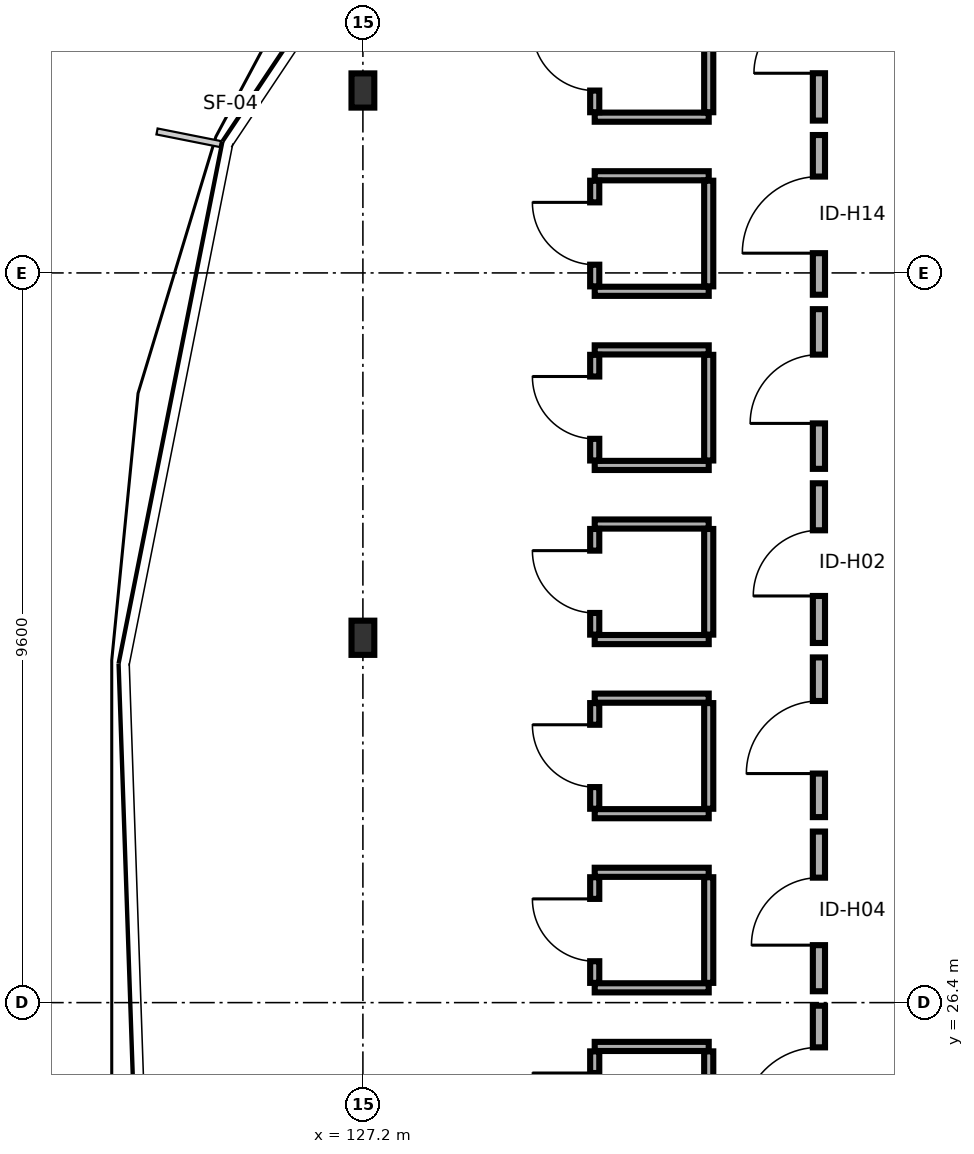
"""IFC4 building model, lengths in metres.
Left out: names, types, materials, properties, quantities, classifications, styles, units other than length and angle.
Written with IfcOpenShell. Run it as: python <this file> out.ifc"""

import sys

from ifc_helpers import new_model, si_unit, direction, frame, frame_2d, origin, origin_2d, place, context, subcontext, project, spatial, rectangle, i_section, extrude, element, fill, save


model = new_model("IFC4")
c1 = context("Model", 3, precision=1e-05, world=origin(), true_north=direction((0.0, 1.0)))
c2 = subcontext(c1, "Body", "Model", "MODEL_VIEW")
j1 = project(units=[si_unit("LENGTHUNIT", "METRE"), si_unit("PLANEANGLEUNIT", "RADIAN")], contexts=[c1])
p1 = place(None, origin())
s1 = spatial("IfcSite", under=j1, at=p1, CompositionType="ELEMENT")
p2 = place(p1, origin())
s2 = spatial("IfcBuilding", under=s1, at=p2, CompositionType="ELEMENT")
p3 = place(p2, frame((0.0, 0.0, 28.3)))
s3 = spatial("IfcBuildingStorey", under=s2, at=p3, CompositionType="ELEMENT", Elevation=28.3)
for number, where, z_axis, x_axis in (
    (1, (127.2, 38.4, 0.0), (0.0, 0.0, 1.0), (1.0, 0.0, 0.0)),
    (2, (127.2, 31.2, 0.0), (0.0, 0.0, 1.0), (1.0, 0.0, 0.0)),
):
    element("IfcColumn", number, at=place(p3, frame(where, z_axis=z_axis, x_axis=x_axis)), inside=s3, PredefinedType="COLUMN", context=c2, shape_type="SweptSolid", body=[
        extrude(i_section(OverallWidth=0.3, OverallDepth=0.45, WebThickness=0.014, FlangeThickness=0.026, FilletRadius=0.027, at=origin_2d()), origin(), (0.0, 0.0, 1.0), 3.4),
    ])
p4 = place(p3, frame((133.2, 38.004, 0.0), z_axis=(0.0, 0.0, 1.0), x_axis=(0.0, 1.0, 0.0)))
e3 = element("IfcWall", 3, at=p4, inside=s3, PredefinedType="PARTITIONING", context=c2, shape_type="SweptSolid", body=[
    extrude(rectangle(XDim=2.101, YDim=0.16, at=frame_2d((1.05, 0.0))), origin(), (0.0, 0.0, 1.0), 2.71),
])
p5 = place(p4, frame((0.623, 0.0, 0.0)))
e4 = element("IfcOpeningElement", 4, at=p5, cuts=e3, PredefinedType="OPENING", context=c2, shape_type="SweptSolid", body=[
    extrude(rectangle(XDim=0.855, YDim=2.05, at=frame_2d((0.427, 1.025))), frame((0.0, 0.09, 0.0), z_axis=(0.0, -1.0, 0.0), x_axis=(1.0, 0.0, 0.0)), (0.0, 0.0, 1.0), 0.18),
])
p6 = place(p3, frame((130.25, 38.049, 0.0), z_axis=(0.0, 0.0, 1.0), x_axis=(1.0, 0.0, 0.0)))
e5 = element("IfcWall", 5, at=p6, inside=s3, PredefinedType="PARTITIONING", context=c2, shape_type="SweptSolid", body=[
    extrude(rectangle(XDim=1.5, YDim=0.12, at=frame_2d((0.75, 0.0))), origin(), (0.0, 0.0, 1.0), 3.175),
])
p7 = place(p3, frame((130.25, 38.114, 0.0), z_axis=(0.0, 0.0, 1.0), x_axis=(0.0, 1.0, 0.0)))
e6 = element("IfcWall", 6, at=p7, inside=s3, PredefinedType="PARTITIONING", context=c2, shape_type="SweptSolid", body=[
    extrude(rectangle(XDim=1.39, YDim=0.12, at=frame_2d((0.695, 0.0))), origin(), (0.0, 0.0, 1.0), 2.71),
])
p8 = place(p7, frame((0.285, 0.0, 0.0)))
e7 = element("IfcOpeningElement", 7, at=p8, cuts=e6, PredefinedType="OPENING", context=c2, shape_type="SweptSolid", body=[
    extrude(rectangle(XDim=0.82, YDim=2.08, at=frame_2d((0.41, 1.04))), frame((0.0, 0.07, 0.0), z_axis=(0.0, -1.0, 0.0), x_axis=(1.0, 0.0, 0.0)), (0.0, 0.0, 1.0), 0.14),
])
p9 = place(p3, frame((131.75, 38.114, 0.0), z_axis=(0.0, 0.0, 1.0), x_axis=(0.0, 1.0, 0.0)))
e8 = element("IfcWall", 8, at=p9, inside=s3, PredefinedType="PARTITIONING", context=c2, shape_type="SweptSolid", body=[
    extrude(rectangle(XDim=1.39, YDim=0.12, at=frame_2d((0.695, 0.0))), origin(), (0.0, 0.0, 1.0), 2.71),
])
p10 = place(p3, frame((133.2, 35.713, 0.0), z_axis=(0.0, 0.0, 1.0), x_axis=(0.0, 1.0, 0.0)))
e9 = element("IfcWall", 9, at=p10, inside=s3, PredefinedType="PARTITIONING", context=c2, shape_type="SweptSolid", body=[
    extrude(rectangle(XDim=2.101, YDim=0.16, at=frame_2d((1.051, 0.0))), origin(), (0.0, 0.0, 1.0), 3.175),
])
p11 = place(p10, frame((0.546, 0.0, 0.0)))
e10 = element("IfcOpeningElement", 10, at=p11, cuts=e9, PredefinedType="OPENING", context=c2, shape_type="SweptSolid", body=[
    extrude(rectangle(XDim=1.008, YDim=2.13, at=frame_2d((0.504, 1.065))), frame((0.0, 0.09, 0.0), z_axis=(0.0, -1.0, 0.0), x_axis=(1.0, 0.0, 0.0)), (0.0, 0.0, 1.0), 0.18),
])
for number, where, z_axis, x_axis in (
    (11, (130.25, 35.758, 0.0), (0.0, 0.0, 1.0), (1.0, 0.0, 0.0)),
    (12, (130.25, 37.278, 0.0), (0.0, 0.0, 1.0), (1.0, 0.0, 0.0)),
):
    element("IfcWall", number, at=place(p3, frame(where, z_axis=z_axis, x_axis=x_axis)), inside=s3, PredefinedType="PARTITIONING", context=c2, shape_type="SweptSolid", body=[
        extrude(rectangle(XDim=1.5, YDim=0.12, at=frame_2d((0.75, 0.0))), origin(), (0.0, 0.0, 1.0), 3.175),
    ])
p12 = place(p3, frame((130.25, 35.823, 0.0), z_axis=(0.0, 0.0, 1.0), x_axis=(0.0, 1.0, 0.0)))
e13 = element("IfcWall", 13, at=p12, inside=s3, PredefinedType="PARTITIONING", context=c2, shape_type="SweptSolid", body=[
    extrude(rectangle(XDim=1.39, YDim=0.12, at=frame_2d((0.695, 0.0))), origin(), (0.0, 0.0, 1.0), 3.175),
])
p13 = place(p12, frame((0.285, 0.0, 0.0)))
e14 = element("IfcOpeningElement", 14, at=p13, cuts=e13, PredefinedType="OPENING", context=c2, shape_type="SweptSolid", body=[
    extrude(rectangle(XDim=0.82, YDim=2.08, at=frame_2d((0.41, 1.04))), frame((0.0, 0.07, 0.0), z_axis=(0.0, -1.0, 0.0), x_axis=(1.0, 0.0, 0.0)), (0.0, 0.0, 1.0), 0.14),
])
p14 = place(p3, frame((131.75, 35.823, 0.0), z_axis=(0.0, 0.0, 1.0), x_axis=(0.0, 1.0, 0.0)))
e15 = element("IfcWall", 15, at=p14, inside=s3, PredefinedType="PARTITIONING", context=c2, shape_type="SweptSolid", body=[
    extrude(rectangle(XDim=1.39, YDim=0.12, at=frame_2d((0.695, 0.0))), origin(), (0.0, 0.0, 1.0), 3.175),
])
p15 = place(p3, frame((133.2, 33.422, 0.0), z_axis=(0.0, 0.0, 1.0), x_axis=(0.0, 1.0, 0.0)))
e16 = element("IfcWall", 16, at=p15, inside=s3, PredefinedType="PARTITIONING", context=c2, shape_type="SweptSolid", body=[
    extrude(rectangle(XDim=2.101, YDim=0.16, at=frame_2d((1.05, 0.0))), origin(), (0.0, 0.0, 1.0), 3.175),
])
p16 = place(p15, frame((0.598, 0.0, 0.0)))
e17 = element("IfcOpeningElement", 17, at=p16, cuts=e16, PredefinedType="OPENING", context=c2, shape_type="SweptSolid", body=[
    extrude(rectangle(XDim=0.905, YDim=2.05, at=frame_2d((0.453, 1.025))), frame((0.0, 0.09, 0.0), z_axis=(0.0, -1.0, 0.0), x_axis=(1.0, 0.0, 0.0)), (0.0, 0.0, 1.0), 0.18),
])
for number, where, z_axis, x_axis in (
    (18, (130.25, 33.467, 0.0), (0.0, 0.0, 1.0), (1.0, 0.0, 0.0)),
    (19, (130.25, 34.987, 0.0), (0.0, 0.0, 1.0), (1.0, 0.0, 0.0)),
):
    element("IfcWall", number, at=place(p3, frame(where, z_axis=z_axis, x_axis=x_axis)), inside=s3, PredefinedType="PARTITIONING", context=c2, shape_type="SweptSolid", body=[
        extrude(rectangle(XDim=1.5, YDim=0.12, at=frame_2d((0.75, 0.0))), origin(), (0.0, 0.0, 1.0), 3.175),
    ])
p17 = place(p3, frame((130.25, 33.532, 0.0), z_axis=(0.0, 0.0, 1.0), x_axis=(0.0, 1.0, 0.0)))
e20 = element("IfcWall", 20, at=p17, inside=s3, PredefinedType="PARTITIONING", context=c2, shape_type="SweptSolid", body=[
    extrude(rectangle(XDim=1.39, YDim=0.12, at=frame_2d((0.695, 0.0))), origin(), (0.0, 0.0, 1.0), 3.175),
])
p18 = place(p17, frame((0.285, 0.0, 0.0)))
e21 = element("IfcOpeningElement", 21, at=p18, cuts=e20, PredefinedType="OPENING", context=c2, shape_type="SweptSolid", body=[
    extrude(rectangle(XDim=0.82, YDim=2.08, at=frame_2d((0.41, 1.04))), frame((0.0, 0.07, 0.0), z_axis=(0.0, -1.0, 0.0), x_axis=(1.0, 0.0, 0.0)), (0.0, 0.0, 1.0), 0.14),
])
p19 = place(p3, frame((131.75, 33.532, 0.0), z_axis=(0.0, 0.0, 1.0), x_axis=(0.0, 1.0, 0.0)))
e22 = element("IfcWall", 22, at=p19, inside=s3, PredefinedType="PARTITIONING", context=c2, shape_type="SweptSolid", body=[
    extrude(rectangle(XDim=1.39, YDim=0.12, at=frame_2d((0.695, 0.0))), origin(), (0.0, 0.0, 1.0), 3.175),
])
p20 = place(p3, frame((133.2, 31.131, 0.0), z_axis=(0.0, 0.0, 1.0), x_axis=(0.0, 1.0, 0.0)))
e23 = element("IfcWall", 23, at=p20, inside=s3, PredefinedType="PARTITIONING", context=c2, shape_type="SweptSolid", body=[
    extrude(rectangle(XDim=2.101, YDim=0.16, at=frame_2d((1.051, 0.0))), origin(), (0.0, 0.0, 1.0), 2.71),
])
p21 = place(p20, frame((0.618, 0.0, 0.0)))
e24 = element("IfcOpeningElement", 24, at=p21, cuts=e23, PredefinedType="OPENING", context=c2, shape_type="SweptSolid", body=[
    extrude(rectangle(XDim=0.864, YDim=2.13, at=frame_2d((0.432, 1.065))), frame((0.0, 0.09, 0.0), z_axis=(0.0, -1.0, 0.0), x_axis=(1.0, 0.0, 0.0)), (0.0, 0.0, 1.0), 0.18),
])
p22 = place(p3, frame((130.25, 31.177, 0.0), z_axis=(0.0, 0.0, 1.0), x_axis=(1.0, 0.0, 0.0)))
e25 = element("IfcWall", 25, at=p22, inside=s3, PredefinedType="PARTITIONING", context=c2, shape_type="SweptSolid", body=[
    extrude(rectangle(XDim=1.5, YDim=0.12, at=frame_2d((0.75, 0.0))), origin(), (0.0, 0.0, 1.0), 2.71),
])
p23 = place(p3, frame((130.25, 32.696, 0.0), z_axis=(0.0, 0.0, 1.0), x_axis=(1.0, 0.0, 0.0)))
e26 = element("IfcWall", 26, at=p23, inside=s3, PredefinedType="PARTITIONING", context=c2, shape_type="SweptSolid", body=[
    extrude(rectangle(XDim=1.5, YDim=0.12, at=frame_2d((0.75, 0.0))), origin(), (0.0, 0.0, 1.0), 3.175),
])
p24 = place(p3, frame((130.25, 31.241, 0.0), z_axis=(0.0, 0.0, 1.0), x_axis=(0.0, 1.0, 0.0)))
e27 = element("IfcWall", 27, at=p24, inside=s3, PredefinedType="PARTITIONING", context=c2, shape_type="SweptSolid", body=[
    extrude(rectangle(XDim=1.39, YDim=0.12, at=frame_2d((0.695, 0.0))), origin(), (0.0, 0.0, 1.0), 2.71),
])
p25 = place(p24, frame((0.285, 0.0, 0.0)))
e28 = element("IfcOpeningElement", 28, at=p25, cuts=e27, PredefinedType="OPENING", context=c2, shape_type="SweptSolid", body=[
    extrude(rectangle(XDim=0.82, YDim=2.08, at=frame_2d((0.41, 1.04))), frame((0.0, 0.07, 0.0), z_axis=(0.0, -1.0, 0.0), x_axis=(1.0, 0.0, 0.0)), (0.0, 0.0, 1.0), 0.14),
])
p26 = place(p3, frame((131.75, 31.241, 0.0), z_axis=(0.0, 0.0, 1.0), x_axis=(0.0, 1.0, 0.0)))
e29 = element("IfcWall", 29, at=p26, inside=s3, PredefinedType="PARTITIONING", context=c2, shape_type="SweptSolid", body=[
    extrude(rectangle(XDim=1.39, YDim=0.12, at=frame_2d((0.695, 0.0))), origin(), (0.0, 0.0, 1.0), 2.71),
])
p27 = place(p3, frame((133.2, 28.841, 0.0), z_axis=(0.0, 0.0, 1.0), x_axis=(0.0, 1.0, 0.0)))
e30 = element("IfcWall", 30, at=p27, inside=s3, PredefinedType="PARTITIONING", context=c2, shape_type="SweptSolid", body=[
    extrude(rectangle(XDim=2.101, YDim=0.16, at=frame_2d((1.05, 0.0))), origin(), (0.0, 0.0, 1.0), 3.175),
])
p28 = place(p27, frame((0.573, 0.0, 0.0)))
e31 = element("IfcOpeningElement", 31, at=p28, cuts=e30, PredefinedType="OPENING", context=c2, shape_type="SweptSolid", body=[
    extrude(rectangle(XDim=0.955, YDim=2.05, at=frame_2d((0.478, 1.025))), frame((0.0, 0.09, 0.0), z_axis=(0.0, -1.0, 0.0), x_axis=(1.0, 0.0, 0.0)), (0.0, 0.0, 1.0), 0.18),
])
for number, where, z_axis, x_axis in (
    (32, (130.25, 28.885, 0.0), (0.0, 0.0, 1.0), (1.0, 0.0, 0.0)),
    (33, (130.25, 30.406, 0.0), (0.0, 0.0, 1.0), (1.0, 0.0, 0.0)),
):
    element("IfcWall", number, at=place(p3, frame(where, z_axis=z_axis, x_axis=x_axis)), inside=s3, PredefinedType="PARTITIONING", context=c2, shape_type="SweptSolid", body=[
        extrude(rectangle(XDim=1.5, YDim=0.12, at=frame_2d((0.75, 0.0))), origin(), (0.0, 0.0, 1.0), 3.175),
    ])
p29 = place(p3, frame((130.25, 28.95, 0.0), z_axis=(0.0, 0.0, 1.0), x_axis=(0.0, 1.0, 0.0)))
e34 = element("IfcWall", 34, at=p29, inside=s3, PredefinedType="PARTITIONING", context=c2, shape_type="SweptSolid", body=[
    extrude(rectangle(XDim=1.39, YDim=0.12, at=frame_2d((0.695, 0.0))), origin(), (0.0, 0.0, 1.0), 3.175),
])
p30 = place(p29, frame((0.285, 0.0, 0.0)))
e35 = element("IfcOpeningElement", 35, at=p30, cuts=e34, PredefinedType="OPENING", context=c2, shape_type="SweptSolid", body=[
    extrude(rectangle(XDim=0.82, YDim=2.08, at=frame_2d((0.41, 1.04))), frame((0.0, 0.07, 0.0), z_axis=(0.0, -1.0, 0.0), x_axis=(1.0, 0.0, 0.0)), (0.0, 0.0, 1.0), 0.14),
])
p31 = place(p3, frame((131.75, 28.95, 0.0), z_axis=(0.0, 0.0, 1.0), x_axis=(0.0, 1.0, 0.0)))
e36 = element("IfcWall", 36, at=p31, inside=s3, PredefinedType="PARTITIONING", context=c2, shape_type="SweptSolid", body=[
    extrude(rectangle(XDim=1.39, YDim=0.12, at=frame_2d((0.695, 0.0))), origin(), (0.0, 0.0, 1.0), 3.175),
])
p32 = place(p3, frame((133.2, 26.55, 0.0), z_axis=(0.0, 0.0, 1.0), x_axis=(0.0, 1.0, 0.0)))
e37 = element("IfcWall", 37, at=p32, inside=s3, PredefinedType="PARTITIONING", context=c2, shape_type="SweptSolid", body=[
    extrude(rectangle(XDim=2.101, YDim=0.16, at=frame_2d((1.05, 0.0))), origin(), (0.0, 0.0, 1.0), 3.175),
])
p33 = place(p32, frame((0.606, 0.0, 0.0)))
e38 = element("IfcOpeningElement", 38, at=p33, cuts=e37, PredefinedType="OPENING", context=c2, shape_type="SweptSolid", body=[
    extrude(rectangle(XDim=0.888, YDim=2.07, at=frame_2d((0.444, 1.035))), frame((0.0, 0.09, 0.0), z_axis=(0.0, -1.0, 0.0), x_axis=(1.0, 0.0, 0.0)), (0.0, 0.0, 1.0), 0.18),
])
for number, where, z_axis, x_axis in (
    (39, (130.25, 26.594, 0.0), (0.0, 0.0, 1.0), (1.0, 0.0, 0.0)),
    (40, (130.25, 28.115, 0.0), (0.0, 0.0, 1.0), (1.0, 0.0, 0.0)),
):
    element("IfcWall", number, at=place(p3, frame(where, z_axis=z_axis, x_axis=x_axis)), inside=s3, PredefinedType="PARTITIONING", context=c2, shape_type="SweptSolid", body=[
        extrude(rectangle(XDim=1.5, YDim=0.12, at=frame_2d((0.75, 0.0))), origin(), (0.0, 0.0, 1.0), 3.175),
    ])
p34 = place(p3, frame((130.25, 26.66, 0.0), z_axis=(0.0, 0.0, 1.0), x_axis=(0.0, 1.0, 0.0)))
e41 = element("IfcWall", 41, at=p34, inside=s3, PredefinedType="PARTITIONING", context=c2, shape_type="SweptSolid", body=[
    extrude(rectangle(XDim=1.39, YDim=0.12, at=frame_2d((0.695, 0.0))), origin(), (0.0, 0.0, 1.0), 3.175),
])
p35 = place(p34, frame((0.285, 0.0, 0.0)))
e42 = element("IfcOpeningElement", 42, at=p35, cuts=e41, PredefinedType="OPENING", context=c2, shape_type="SweptSolid", body=[
    extrude(rectangle(XDim=0.82, YDim=2.08, at=frame_2d((0.41, 1.04))), frame((0.0, 0.07, 0.0), z_axis=(0.0, -1.0, 0.0), x_axis=(1.0, 0.0, 0.0)), (0.0, 0.0, 1.0), 0.14),
])
p36 = place(p3, frame((131.75, 26.66, 0.0), z_axis=(0.0, 0.0, 1.0), x_axis=(0.0, 1.0, 0.0)))
e43 = element("IfcWall", 43, at=p36, inside=s3, PredefinedType="PARTITIONING", context=c2, shape_type="SweptSolid", body=[
    extrude(rectangle(XDim=1.39, YDim=0.12, at=frame_2d((0.695, 0.0))), origin(), (0.0, 0.0, 1.0), 3.175),
])
p37 = place(p3, frame((133.2, 24.259, 0.0), z_axis=(0.0, 0.0, 1.0), x_axis=(0.0, 1.0, 0.0)))
e44 = element("IfcWall", 44, at=p37, inside=s3, PredefinedType="PARTITIONING", context=c2, shape_type="SweptSolid", body=[
    extrude(rectangle(XDim=2.101, YDim=0.16, at=frame_2d((1.051, 0.0))), origin(), (0.0, 0.0, 1.0), 3.175),
])
p38 = place(p37, frame((0.548, 0.0, 0.0)))
e45 = element("IfcOpeningElement", 45, at=p38, cuts=e44, PredefinedType="OPENING", context=c2, shape_type="SweptSolid", body=[
    extrude(rectangle(XDim=1.005, YDim=2.05, at=frame_2d((0.502, 1.025))), frame((0.0, 0.09, 0.0), z_axis=(0.0, -1.0, 0.0), x_axis=(1.0, 0.0, 0.0)), (0.0, 0.0, 1.0), 0.18),
])
p39 = place(p3, frame((130.25, 25.823, 0.0), z_axis=(0.0, 0.0, 1.0), x_axis=(1.0, 0.0, 0.0)))
e46 = element("IfcWall", 46, at=p39, inside=s3, PredefinedType="PARTITIONING", context=c2, shape_type="SweptSolid", body=[
    extrude(rectangle(XDim=1.5, YDim=0.12, at=frame_2d((0.75, 0.0))), origin(), (0.0, 0.0, 1.0), 3.175),
])
p40 = place(p3, frame((130.25, 24.369, 0.0), z_axis=(0.0, 0.0, 1.0), x_axis=(0.0, 1.0, 0.0)))
e47 = element("IfcWall", 47, at=p40, inside=s3, PredefinedType="PARTITIONING", context=c2, shape_type="SweptSolid", body=[
    extrude(rectangle(XDim=1.39, YDim=0.12, at=frame_2d((0.695, 0.0))), origin(), (0.0, 0.0, 1.0), 3.175),
])
p41 = place(p40, frame((0.285, 0.0, 0.0)))
e48 = element("IfcOpeningElement", 48, at=p41, cuts=e47, PredefinedType="OPENING", context=c2, shape_type="SweptSolid", body=[
    extrude(rectangle(XDim=0.82, YDim=2.08, at=frame_2d((0.41, 1.04))), frame((0.0, 0.07, 0.0), z_axis=(0.0, -1.0, 0.0), x_axis=(1.0, 0.0, 0.0)), (0.0, 0.0, 1.0), 0.14),
])
p42 = place(p3, frame((131.75, 24.369, 0.0), z_axis=(0.0, 0.0, 1.0), x_axis=(0.0, 1.0, 0.0)))
e49 = element("IfcWall", 49, at=p42, inside=s3, PredefinedType="PARTITIONING", context=c2, shape_type="SweptSolid", body=[
    extrude(rectangle(XDim=1.39, YDim=0.12, at=frame_2d((0.695, 0.0))), origin(), (0.0, 0.0, 1.0), 3.175),
])
p43 = place(p5, origin())
e50 = element("IfcDoor", 50, at=p43, inside=s3, OperationType="SINGLE_SWING_LEFT", PredefinedType="DOOR", context=c2, shape_type="SweptSolid", body=[
    extrude(rectangle(XDim=0.855, YDim=2.05, at=frame_2d((0.427, 1.025))), frame((0.0, 0.025, 0.0), z_axis=(0.0, -1.0, 0.0), x_axis=(1.0, 0.0, 0.0)), (0.0, 0.0, 1.0), 0.05),
])
fill(e4, e50)
p44 = place(p8, origin())
e51 = element("IfcDoor", 51, at=p44, inside=s3, OperationType="SINGLE_SWING_RIGHT", PredefinedType="DOOR", context=c2, shape_type="SweptSolid", body=[
    extrude(rectangle(XDim=0.82, YDim=2.08, at=frame_2d((0.41, 1.04))), frame((0.0, 0.025, 0.0), z_axis=(0.0, -1.0, 0.0), x_axis=(1.0, 0.0, 0.0)), (0.0, 0.0, 1.0), 0.05),
])
fill(e7, e51)
p45 = place(p11, origin())
e52 = element("IfcDoor", 52, at=p45, inside=s3, OperationType="SINGLE_SWING_LEFT", PredefinedType="DOOR", context=c2, shape_type="SweptSolid", body=[
    extrude(rectangle(XDim=1.008, YDim=2.13, at=frame_2d((0.504, 1.065))), frame((0.0, 0.025, 0.0), z_axis=(0.0, -1.0, 0.0), x_axis=(1.0, 0.0, 0.0)), (0.0, 0.0, 1.0), 0.05),
])
fill(e10, e52)
p46 = place(p13, origin())
e53 = element("IfcDoor", 53, at=p46, inside=s3, OperationType="SINGLE_SWING_RIGHT", PredefinedType="DOOR", context=c2, shape_type="SweptSolid", body=[
    extrude(rectangle(XDim=0.82, YDim=2.08, at=frame_2d((0.41, 1.04))), frame((0.0, 0.025, 0.0), z_axis=(0.0, -1.0, 0.0), x_axis=(1.0, 0.0, 0.0)), (0.0, 0.0, 1.0), 0.05),
])
fill(e14, e53)
p47 = place(p16, origin())
e54 = element("IfcDoor", 54, at=p47, inside=s3, OperationType="SINGLE_SWING_LEFT", PredefinedType="DOOR", context=c2, shape_type="SweptSolid", body=[
    extrude(rectangle(XDim=0.905, YDim=2.05, at=frame_2d((0.453, 1.025))), frame((0.0, 0.025, 0.0), z_axis=(0.0, -1.0, 0.0), x_axis=(1.0, 0.0, 0.0)), (0.0, 0.0, 1.0), 0.05),
])
fill(e17, e54)
p48 = place(p18, origin())
e55 = element("IfcDoor", 55, at=p48, inside=s3, OperationType="SINGLE_SWING_RIGHT", PredefinedType="DOOR", context=c2, shape_type="SweptSolid", body=[
    extrude(rectangle(XDim=0.82, YDim=2.08, at=frame_2d((0.41, 1.04))), frame((0.0, 0.025, 0.0), z_axis=(0.0, -1.0, 0.0), x_axis=(1.0, 0.0, 0.0)), (0.0, 0.0, 1.0), 0.05),
])
fill(e21, e55)
p49 = place(p21, origin())
e56 = element("IfcDoor", 56, at=p49, inside=s3, OperationType="SINGLE_SWING_LEFT", PredefinedType="DOOR", context=c2, shape_type="SweptSolid", body=[
    extrude(rectangle(XDim=0.864, YDim=2.13, at=frame_2d((0.432, 1.065))), frame((0.0, 0.025, 0.0), z_axis=(0.0, -1.0, 0.0), x_axis=(1.0, 0.0, 0.0)), (0.0, 0.0, 1.0), 0.05),
])
fill(e24, e56)
p50 = place(p25, origin())
e57 = element("IfcDoor", 57, at=p50, inside=s3, OperationType="SINGLE_SWING_RIGHT", PredefinedType="DOOR", context=c2, shape_type="SweptSolid", body=[
    extrude(rectangle(XDim=0.82, YDim=2.08, at=frame_2d((0.41, 1.04))), frame((0.0, 0.025, 0.0), z_axis=(0.0, -1.0, 0.0), x_axis=(1.0, 0.0, 0.0)), (0.0, 0.0, 1.0), 0.05),
])
fill(e28, e57)
p51 = place(p28, origin())
e58 = element("IfcDoor", 58, at=p51, inside=s3, OperationType="SINGLE_SWING_LEFT", PredefinedType="DOOR", context=c2, shape_type="SweptSolid", body=[
    extrude(rectangle(XDim=0.955, YDim=2.05, at=frame_2d((0.478, 1.025))), frame((0.0, 0.025, 0.0), z_axis=(0.0, -1.0, 0.0), x_axis=(1.0, 0.0, 0.0)), (0.0, 0.0, 1.0), 0.05),
])
fill(e31, e58)
p52 = place(p30, origin())
e59 = element("IfcDoor", 59, at=p52, inside=s3, OperationType="SINGLE_SWING_RIGHT", PredefinedType="DOOR", context=c2, shape_type="SweptSolid", body=[
    extrude(rectangle(XDim=0.82, YDim=2.08, at=frame_2d((0.41, 1.04))), frame((0.0, 0.025, 0.0), z_axis=(0.0, -1.0, 0.0), x_axis=(1.0, 0.0, 0.0)), (0.0, 0.0, 1.0), 0.05),
])
fill(e35, e59)
p53 = place(p33, origin())
e60 = element("IfcDoor", 60, at=p53, inside=s3, OperationType="SINGLE_SWING_LEFT", PredefinedType="DOOR", context=c2, shape_type="SweptSolid", body=[
    extrude(rectangle(XDim=0.888, YDim=2.07, at=frame_2d((0.444, 1.035))), frame((0.0, 0.025, 0.0), z_axis=(0.0, -1.0, 0.0), x_axis=(1.0, 0.0, 0.0)), (0.0, 0.0, 1.0), 0.05),
])
fill(e38, e60)
p54 = place(p35, origin())
e61 = element("IfcDoor", 61, at=p54, inside=s3, OperationType="SINGLE_SWING_RIGHT", PredefinedType="DOOR", context=c2, shape_type="SweptSolid", body=[
    extrude(rectangle(XDim=0.82, YDim=2.08, at=frame_2d((0.41, 1.04))), frame((0.0, 0.025, 0.0), z_axis=(0.0, -1.0, 0.0), x_axis=(1.0, 0.0, 0.0)), (0.0, 0.0, 1.0), 0.05),
])
fill(e42, e61)
p55 = place(p38, origin())
e62 = element("IfcDoor", 62, at=p55, inside=s3, OperationType="SINGLE_SWING_LEFT", PredefinedType="DOOR", context=c2, shape_type="SweptSolid", body=[
    extrude(rectangle(XDim=1.005, YDim=2.05, at=frame_2d((0.502, 1.025))), frame((0.0, 0.025, 0.0), z_axis=(0.0, -1.0, 0.0), x_axis=(1.0, 0.0, 0.0)), (0.0, 0.0, 1.0), 0.05),
])
fill(e45, e62)
p56 = place(p41, origin())
e63 = element("IfcDoor", 63, at=p56, inside=s3, OperationType="SINGLE_SWING_RIGHT", PredefinedType="DOOR", context=c2, shape_type="SweptSolid", body=[
    extrude(rectangle(XDim=0.82, YDim=2.08, at=frame_2d((0.41, 1.04))), frame((0.0, 0.025, 0.0), z_axis=(0.0, -1.0, 0.0), x_axis=(1.0, 0.0, 0.0)), (0.0, 0.0, 1.0), 0.05),
])
fill(e48, e63)
save(model, sys.argv[1])
